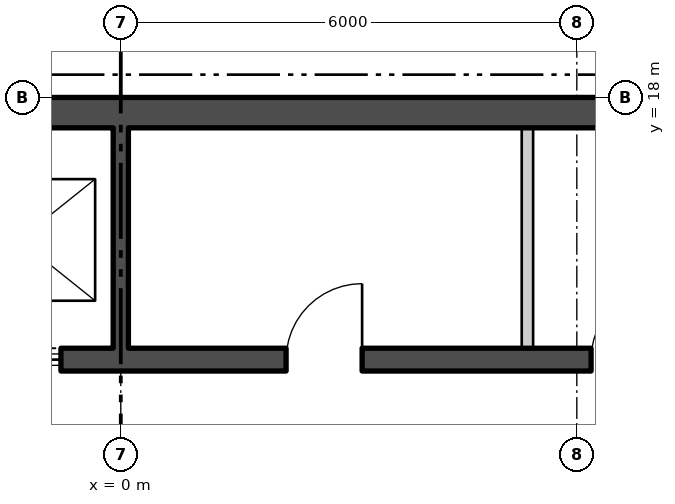
"""IFC4 building model, lengths in metres.
Left out: names, types, materials, properties, quantities, classifications, styles, units other than length and angle.
Written with IfcOpenShell. Run it as: python <this file> out.ifc"""

import sys

from ifc_helpers import new_model, si_unit, direction, frame, frame_2d, origin, place, context, subcontext, project, spatial, polyline, rectangle, outline, extrude, element, fill, save


model = new_model("IFC4")
c1 = context("Model", 3, precision=1e-05, world=origin(), true_north=direction((0.0, 1.0)))
c2 = subcontext(c1, "Body", "Model", "MODEL_VIEW")
j1 = project(units=[si_unit("LENGTHUNIT", "METRE"), si_unit("PLANEANGLEUNIT", "RADIAN")], contexts=[c1])
p1 = place(None, origin())
s1 = spatial("IfcSite", under=j1, at=p1, CompositionType="ELEMENT")
p2 = place(p1, origin())
s2 = spatial("IfcBuilding", under=s1, at=p2, CompositionType="ELEMENT")
p3 = place(p2, frame((0.0, 0.0, 321.0)))
s3 = spatial("IfcBuildingStorey", under=s2, at=p3, CompositionType="ELEMENT", Elevation=321.0)
p4 = place(p3, frame((2.01, -23.11, -0.18), z_axis=(0.0, 0.0, 1.0), x_axis=(0.500000141277, 0.866025322218, 0.0)))
e1 = element("IfcWall", 1, at=p4, inside=s3, PredefinedType="SOLIDWALL", context=c2, shape_type="SweptSolid", body=[
    extrude(outline(polyline([(-0.13, -0.225), (45.86, -0.225), (45.6, 0.225), (0.13, 0.225), (-0.13, -0.225)])), origin(), (0.0, 0.0, 1.0), 3.98),
])
p5 = place(p4, frame((1.424, 0.0, 1.08)))
e2 = element("IfcOpeningElement", 2, at=p5, cuts=e1, PredefinedType="OPENING", context=c2, shape_type="SweptSolid", body=[
    extrude(rectangle(XDim=2.4, YDim=2.3, at=frame_2d((1.2, 1.15))), frame((0.0, 0.235, 0.0), z_axis=(0.0, -1.0, 0.0), x_axis=(1.0, 0.0, 0.0)), (0.0, 0.0, 1.0), 0.47),
])
p6 = place(p4, frame((5.892, 0.0, 1.08)))
e3 = element("IfcOpeningElement", 3, at=p6, cuts=e1, PredefinedType="OPENING", context=c2, shape_type="SweptSolid", body=[
    extrude(rectangle(XDim=2.4, YDim=2.3, at=frame_2d((1.2, 1.15))), frame((0.0, 0.235, 0.0), z_axis=(0.0, -1.0, 0.0), x_axis=(1.0, 0.0, 0.0)), (0.0, 0.0, 1.0), 0.47),
])
p7 = place(p4, frame((14.905, 0.0, 1.08)))
e4 = element("IfcOpeningElement", 4, at=p7, cuts=e1, PredefinedType="OPENING", context=c2, shape_type="SweptSolid", body=[
    extrude(rectangle(XDim=2.4, YDim=2.3, at=frame_2d((1.2, 1.15))), frame((0.0, 0.235, 0.0), z_axis=(0.0, -1.0, 0.0), x_axis=(1.0, 0.0, 0.0)), (0.0, 0.0, 1.0), 0.47),
])
p8 = place(p4, frame((19.412, 0.0, 1.08)))
e5 = element("IfcOpeningElement", 5, at=p8, cuts=e1, PredefinedType="OPENING", context=c2, shape_type="SweptSolid", body=[
    extrude(rectangle(XDim=2.4, YDim=2.3, at=frame_2d((1.2, 1.15))), frame((0.0, 0.235, 0.0), z_axis=(0.0, -1.0, 0.0), x_axis=(1.0, 0.0, 0.0)), (0.0, 0.0, 1.0), 0.47),
])
p9 = place(p4, frame((23.918, 0.0, 1.08)))
e6 = element("IfcOpeningElement", 6, at=p9, cuts=e1, PredefinedType="OPENING", context=c2, shape_type="SweptSolid", body=[
    extrude(rectangle(XDim=2.4, YDim=2.3, at=frame_2d((1.2, 1.15))), frame((0.0, 0.235, 0.0), z_axis=(0.0, -1.0, 0.0), x_axis=(1.0, 0.0, 0.0)), (0.0, 0.0, 1.0), 0.47),
])
p10 = place(p4, frame((28.425, 0.0, 1.08)))
e7 = element("IfcOpeningElement", 7, at=p10, cuts=e1, PredefinedType="OPENING", context=c2, shape_type="SweptSolid", body=[
    extrude(rectangle(XDim=2.4, YDim=2.3, at=frame_2d((1.2, 1.15))), frame((0.0, 0.235, 0.0), z_axis=(0.0, -1.0, 0.0), x_axis=(1.0, 0.0, 0.0)), (0.0, 0.0, 1.0), 0.47),
])
p11 = place(p4, frame((37.438, 0.0, 1.08)))
e8 = element("IfcOpeningElement", 8, at=p11, cuts=e1, PredefinedType="OPENING", context=c2, shape_type="SweptSolid", body=[
    extrude(rectangle(XDim=2.4, YDim=2.3, at=frame_2d((1.2, 1.15))), frame((0.0, 0.235, 0.0), z_axis=(0.0, -1.0, 0.0), x_axis=(1.0, 0.0, 0.0)), (0.0, 0.0, 1.0), 0.47),
])
p12 = place(p4, frame((41.907, 0.0, 1.08)))
e9 = element("IfcOpeningElement", 9, at=p12, cuts=e1, PredefinedType="OPENING", context=c2, shape_type="SweptSolid", body=[
    extrude(rectangle(XDim=2.4, YDim=2.3, at=frame_2d((1.2, 1.15))), frame((0.0, 0.235, 0.0), z_axis=(0.0, -1.0, 0.0), x_axis=(1.0, 0.0, 0.0)), (0.0, 0.0, 1.0), 0.47),
])
p13 = place(p3, frame((-14.5, 17.8, 0.0), z_axis=(0.0, 0.0, 1.0), x_axis=(1.0, 0.0, 0.0)))
e10 = element("IfcWall", 10, at=p13, inside=s3, PredefinedType="SHEAR", context=c2, shape_type="SweptSolid", body=[
    extrude(rectangle(XDim=29.0, YDim=0.4, at=frame_2d((14.5, 0.0))), origin(), (0.0, 0.0, 1.0), 4.0),
])
p14 = place(p3, frame((-10.7, 14.55, 0.0), z_axis=(0.0, 0.0, 1.0), x_axis=(1.0, 0.0, 0.0)))
e11 = element("IfcWall", 11, at=p14, inside=s3, PredefinedType="SHEAR", context=c2, shape_type="SweptSolid", body=[
    extrude(rectangle(XDim=21.4, YDim=0.3, at=frame_2d((10.7, 0.0))), origin(), (0.0, 0.0, 1.0), 4.0),
])
p15 = place(p14, frame((0.738, 0.0, 0.0)))
e12 = element("IfcOpeningElement", 12, at=p15, cuts=e11, PredefinedType="OPENING", context=c2, shape_type="SweptSolid", body=[
    extrude(rectangle(XDim=1.1, YDim=2.1, at=frame_2d((0.55, 1.05))), frame((0.0, 0.16, 0.0), z_axis=(0.0, -1.0, 0.0), x_axis=(1.0, 0.0, 0.0)), (0.0, 0.0, 1.0), 0.32),
])
p16 = place(p14, frame((3.462, 0.0, 0.0)))
e13 = element("IfcOpeningElement", 13, at=p16, cuts=e11, PredefinedType="OPENING", context=c2, shape_type="SweptSolid", body=[
    extrude(rectangle(XDim=1.1, YDim=2.1, at=frame_2d((0.55, 1.05))), frame((0.0, 0.16, 0.0), z_axis=(0.0, -1.0, 0.0), x_axis=(1.0, 0.0, 0.0)), (0.0, 0.0, 1.0), 0.32),
])
p17 = place(p14, frame((6.138, 0.0, 0.0)))
e14 = element("IfcOpeningElement", 14, at=p17, cuts=e11, PredefinedType="OPENING", context=c2, shape_type="SweptSolid", body=[
    extrude(rectangle(XDim=1.1, YDim=2.1, at=frame_2d((0.55, 1.05))), frame((0.0, 0.16, 0.0), z_axis=(0.0, -1.0, 0.0), x_axis=(1.0, 0.0, 0.0)), (0.0, 0.0, 1.0), 0.32),
])
p18 = place(p14, frame((8.812, 0.0, 0.0)))
e15 = element("IfcOpeningElement", 15, at=p18, cuts=e11, PredefinedType="OPENING", context=c2, shape_type="SweptSolid", body=[
    extrude(rectangle(XDim=1.1, YDim=2.1, at=frame_2d((0.55, 1.05))), frame((0.0, 0.16, 0.0), z_axis=(0.0, -1.0, 0.0), x_axis=(1.0, 0.0, 0.0)), (0.0, 0.0, 1.0), 0.32),
])
p19 = place(p14, frame((19.562, 0.0, 0.0)))
e16 = element("IfcOpeningElement", 16, at=p19, cuts=e11, PredefinedType="OPENING", context=c2, shape_type="SweptSolid", body=[
    extrude(rectangle(XDim=1.1, YDim=2.1, at=frame_2d((0.55, 1.05))), frame((0.0, 0.16, 0.0), z_axis=(0.0, -1.0, 0.0), x_axis=(1.0, 0.0, 0.0)), (0.0, 0.0, 1.0), 0.32),
])
p20 = place(p14, frame((12.875, 0.0, 0.0)))
e17 = element("IfcOpeningElement", 17, at=p20, cuts=e11, PredefinedType="OPENING", context=c2, shape_type="SweptSolid", body=[
    extrude(rectangle(XDim=1.0, YDim=2.1, at=frame_2d((0.5, 1.05))), frame((0.0, 0.16, 0.0), z_axis=(0.0, -1.0, 0.0), x_axis=(1.0, 0.0, 0.0)), (0.0, 0.0, 1.0), 0.32),
])
p21 = place(p14, frame((16.887, 0.0, 0.0)))
e18 = element("IfcOpeningElement", 18, at=p21, cuts=e11, PredefinedType="OPENING", context=c2, shape_type="SweptSolid", body=[
    extrude(rectangle(XDim=1.0, YDim=2.1, at=frame_2d((0.5, 1.05))), frame((0.0, 0.16, 0.0), z_axis=(0.0, -1.0, 0.0), x_axis=(1.0, 0.0, 0.0)), (0.0, 0.0, 1.0), 0.32),
])
p22 = place(p3, frame((0.0, 14.7, 0.0), z_axis=(0.0, 0.0, 1.0), x_axis=(0.0, 1.0, 0.0)))
e19 = element("IfcWall", 19, at=p22, inside=s3, PredefinedType="SHEAR", context=c2, shape_type="SweptSolid", body=[
    extrude(rectangle(XDim=2.9, YDim=0.2, at=frame_2d((1.45, 0.0))), origin(), (0.0, 0.0, 1.0), 4.0),
])
p23 = place(p3, frame((5.35, 14.7, 0.0), z_axis=(0.0, 0.0, 1.0), x_axis=(0.0, 1.0, 0.0)))
e20 = element("IfcWall", 20, at=p23, inside=s3, PredefinedType="PARTITIONING", context=c2, shape_type="SweptSolid", body=[
    extrude(rectangle(XDim=2.9, YDim=0.15, at=frame_2d((1.45, 0.0))), origin(), (0.0, 0.0, 1.0), 4.0),
])
p24 = place(p18, origin())
e21 = element("IfcDoor", 21, at=p24, inside=s3, OperationType="SLIDING_TO_LEFT", PredefinedType="DOOR", context=c2, shape_type="SweptSolid", body=[
    extrude(rectangle(XDim=1.1, YDim=2.1, at=frame_2d((0.55, 1.05))), frame((0.0, 0.025, 0.0), z_axis=(0.0, -1.0, 0.0), x_axis=(1.0, 0.0, 0.0)), (0.0, 0.0, 1.0), 0.05),
])
fill(e15, e21)
p25 = place(p20, origin())
e22 = element("IfcDoor", 22, at=p25, inside=s3, OperationType="SINGLE_SWING_LEFT", PredefinedType="DOOR", context=c2, shape_type="SweptSolid", body=[
    extrude(rectangle(XDim=1.0, YDim=2.1, at=frame_2d((0.5, 1.05))), frame((0.0, 0.025, 0.0), z_axis=(0.0, -1.0, 0.0), x_axis=(1.0, 0.0, 0.0)), (0.0, 0.0, 1.0), 0.05),
])
fill(e17, e22)
p26 = place(p21, origin())
e23 = element("IfcDoor", 23, at=p26, inside=s3, OperationType="SINGLE_SWING_LEFT", PredefinedType="DOOR", context=c2, shape_type="SweptSolid", body=[
    extrude(rectangle(XDim=1.0, YDim=2.1, at=frame_2d((0.5, 1.05))), frame((0.0, 0.025, 0.0), z_axis=(0.0, -1.0, 0.0), x_axis=(1.0, 0.0, 0.0)), (0.0, 0.0, 1.0), 0.05),
])
fill(e18, e23)
save(model, sys.argv[1])
